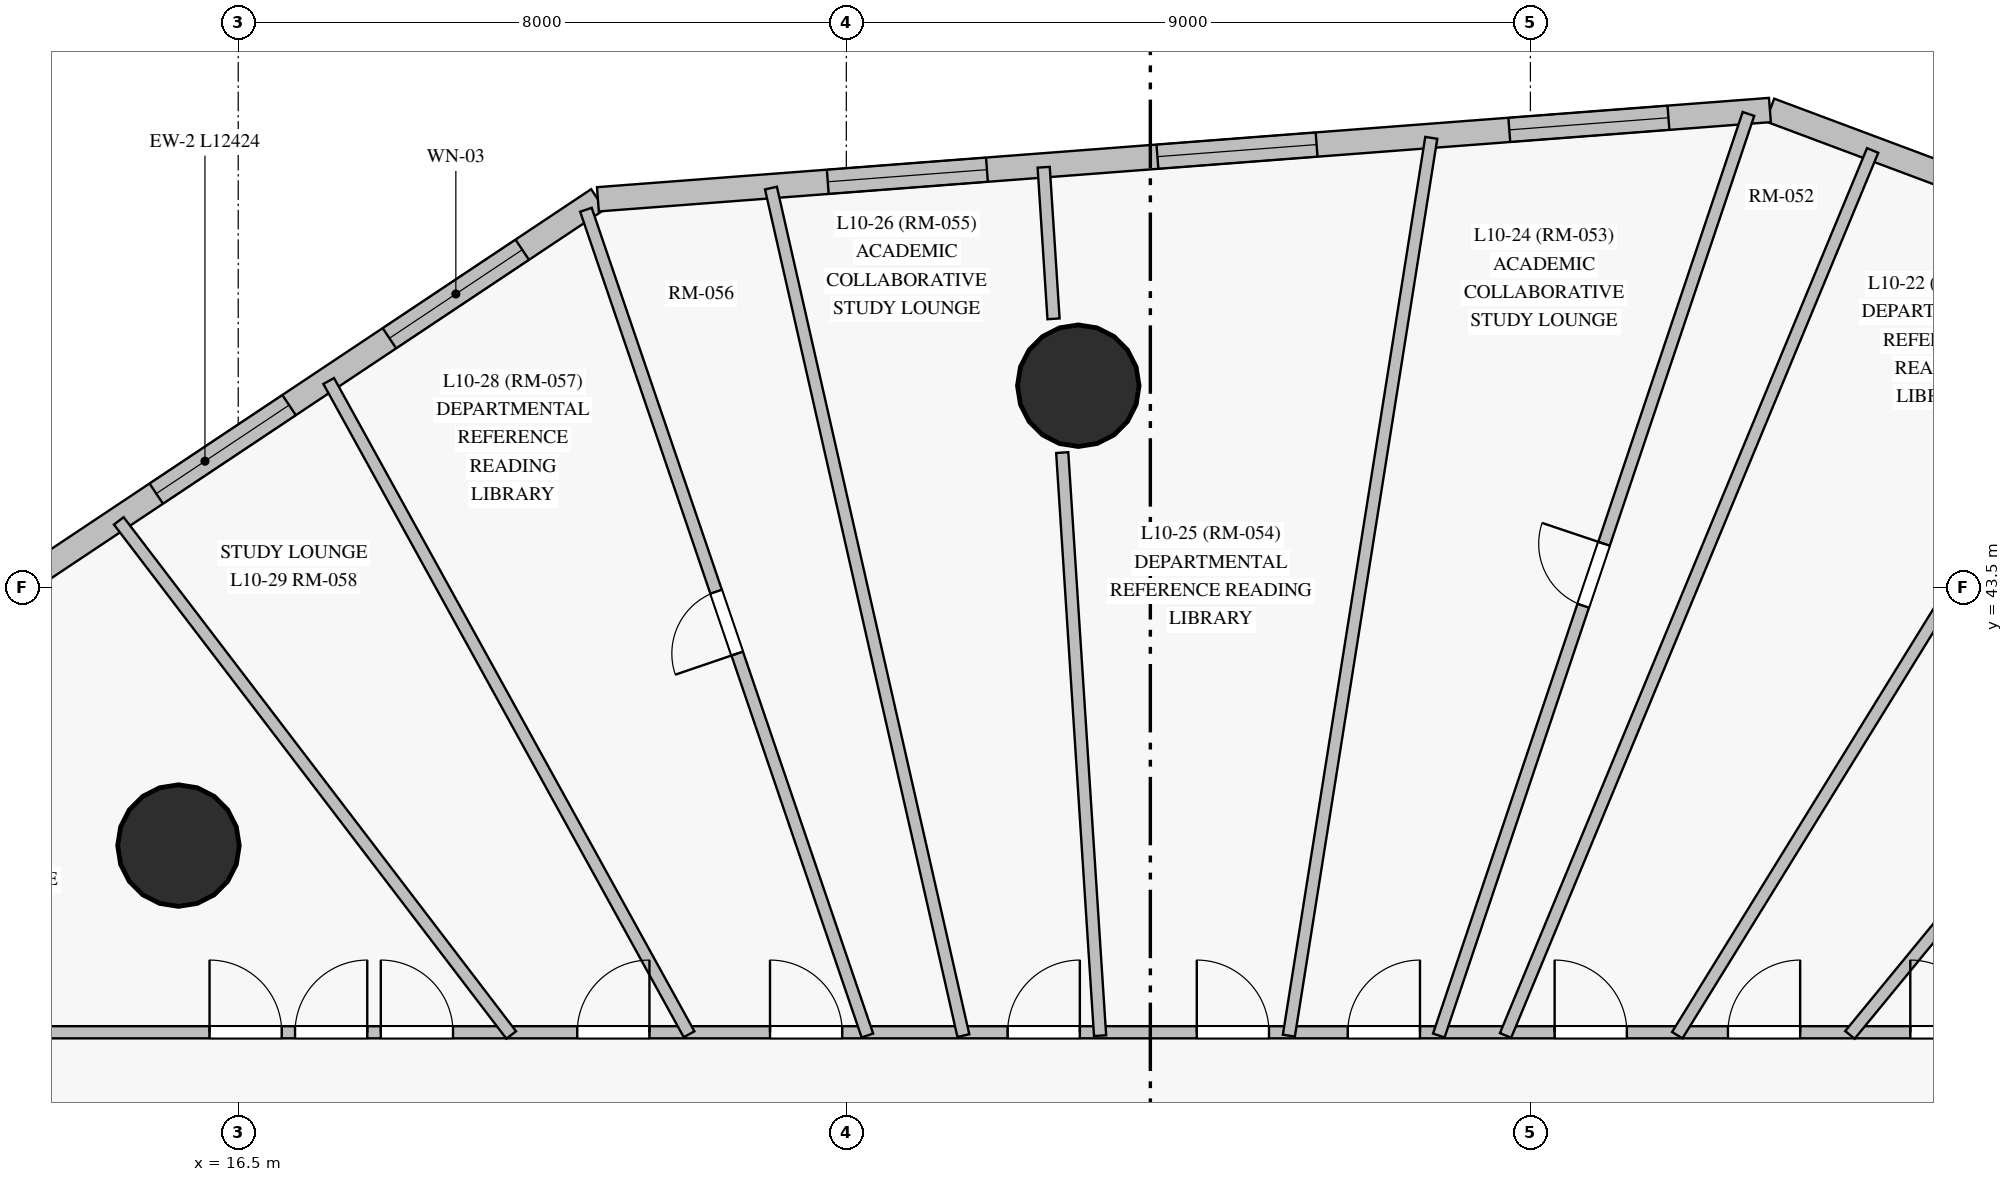
"""IFC4 building model, lengths in metres.
Left out: names, types, materials, properties, quantities, classifications, styles, units other than length and angle.
Written with IfcOpenShell. Run it as: python <this file> out.ifc"""

import sys

from ifc_helpers import new_model, si_unit, direction, frame, frame_2d, origin, origin_with_axes, origin_2d, place, context, subcontext, project, spatial, rectangle, circle, extrude, source, transform, mapped, element, fill, save


model = new_model("IFC4")
c1 = context("Model", 3, precision=1e-05, world=origin(), true_north=direction((0.0, 1.0)))
c2 = subcontext(c1, "Body", "Model", "MODEL_VIEW")
j1 = project(units=[si_unit("LENGTHUNIT", "METRE"), si_unit("PLANEANGLEUNIT", "RADIAN")], contexts=[c1])
p1 = place(None, origin())
s1 = spatial("IfcSite", under=j1, at=p1, CompositionType="ELEMENT")
p2 = place(p1, origin())
s2 = spatial("IfcBuilding", under=s1, at=p2, CompositionType="ELEMENT")
p3 = place(p2, frame((0.0, 0.0, 40.9)))
s3 = spatial("IfcBuildingStorey", under=s2, at=p3, CompositionType="ELEMENT", Elevation=40.9)
m1 = source(origin_with_axes(), c2, "Body", "SweptSolid", [
    extrude(circle(Radius=0.8, at=origin_2d()), origin(), (0.0, 0.0, 1.0), 3.6),
])
for number, where, z_axis, x_axis in (
    (1, (27.552, 46.156, 0.0), (0.0, 0.0, 1.0), (1.0, 0.0, 0.0)),
    (2, (15.714, 40.106, 0.0), (0.0, 0.0, 1.0), (1.0, 0.0, 0.0)),
):
    element("IfcColumn", number, at=place(p3, frame(where, z_axis=z_axis, x_axis=x_axis)), inside=s3, PredefinedType="COLUMN", context=c2, shape_type="MappedRepresentation", body=[
        mapped(m1, transform((0.0, 0.0, 0.0), scale=1.0)),
    ])
p4 = place(p3, frame((21.232, 48.608, 0.0), z_axis=(0.0, 0.0, 1.0), x_axis=(-0.832150043839, -0.554550542816, 0.0)))
e3 = element("IfcWall", 3, at=p4, inside=s3, PredefinedType="SOLIDWALL", context=c2, shape_type="SweptSolid", body=[
    extrude(rectangle(XDim=12.424, YDim=0.32, at=frame_2d((6.212, 0.0))), origin(), (0.0, 0.0, 1.0), 3.35),
])
p5 = place(p4, frame((1.196, 0.0, 0.85)))
e4 = element("IfcOpeningElement", 4, at=p5, cuts=e3, PredefinedType="OPENING", context=c2, shape_type="SweptSolid", body=[
    extrude(rectangle(XDim=2.1, YDim=1.95, at=frame_2d((1.05, 0.975))), frame((0.0, 0.17, 0.0), z_axis=(0.0, -1.0, 0.0), x_axis=(1.0, 0.0, 0.0)), (0.0, 0.0, 1.0), 0.34),
])
p6 = place(p4, frame((4.882, 0.0, 0.85)))
e5 = element("IfcOpeningElement", 5, at=p6, cuts=e3, PredefinedType="OPENING", context=c2, shape_type="SweptSolid", body=[
    extrude(rectangle(XDim=2.1, YDim=1.95, at=frame_2d((1.05, 0.975))), frame((0.0, 0.17, 0.0), z_axis=(0.0, -1.0, 0.0), x_axis=(1.0, 0.0, 0.0)), (0.0, 0.0, 1.0), 0.34),
])
p7 = place(p4, frame((8.927, 0.0, 0.85)))
e6 = element("IfcOpeningElement", 6, at=p7, cuts=e3, PredefinedType="OPENING", context=c2, shape_type="SweptSolid", body=[
    extrude(rectangle(XDim=2.1, YDim=1.95, at=frame_2d((1.05, 0.975))), frame((0.0, 0.17, 0.0), z_axis=(0.0, -1.0, 0.0), x_axis=(1.0, 0.0, 0.0)), (0.0, 0.0, 1.0), 0.34),
])
p8 = place(p3, frame((46.618, 46.054, 0.0), z_axis=(0.0, 0.0, 1.0), x_axis=(-0.936577845609, 0.350459611246, 0.0)))
e7 = element("IfcWall", 7, at=p8, inside=s3, PredefinedType="SOLIDWALL", context=c2, shape_type="SweptSolid", body=[
    extrude(rectangle(XDim=10.642, YDim=0.32, at=frame_2d((5.321, 0.0))), origin(), (0.0, 0.0, 1.0), 3.35),
])
p9 = place(p8, frame((2.368, 0.0, 0.85)))
e8 = element("IfcOpeningElement", 8, at=p9, cuts=e7, PredefinedType="OPENING", context=c2, shape_type="SweptSolid", body=[
    extrude(rectangle(XDim=2.1, YDim=1.95, at=frame_2d((1.05, 0.975))), frame((0.0, 0.17, 0.0), z_axis=(0.0, -1.0, 0.0), x_axis=(1.0, 0.0, 0.0)), (0.0, 0.0, 1.0), 0.34),
])
p10 = place(p8, frame((6.141, 0.0, 0.85)))
e9 = element("IfcOpeningElement", 9, at=p10, cuts=e7, PredefinedType="OPENING", context=c2, shape_type="SweptSolid", body=[
    extrude(rectangle(XDim=2.1, YDim=1.95, at=frame_2d((1.05, 0.975))), frame((0.0, 0.17, 0.0), z_axis=(0.0, -1.0, 0.0), x_axis=(1.0, 0.0, 0.0)), (0.0, 0.0, 1.0), 0.34),
])
p11 = place(p3, frame((36.651, 49.783, 0.0), z_axis=(0.0, 0.0, 1.0), x_axis=(-0.997110035998, -0.075970889897, 0.0)))
e10 = element("IfcWall", 10, at=p11, inside=s3, PredefinedType="SOLIDWALL", context=c2, shape_type="SweptSolid", body=[
    extrude(rectangle(XDim=15.464, YDim=0.32, at=frame_2d((7.732, 0.0))), origin(), (0.0, 0.0, 1.0), 3.35),
])
p12 = place(p11, frame((1.339, 0.0, 0.85)))
e11 = element("IfcOpeningElement", 11, at=p12, cuts=e10, PredefinedType="OPENING", context=c2, shape_type="SweptSolid", body=[
    extrude(rectangle(XDim=2.1, YDim=1.95, at=frame_2d((1.05, 0.975))), frame((0.0, 0.17, 0.0), z_axis=(0.0, -1.0, 0.0), x_axis=(1.0, 0.0, 0.0)), (0.0, 0.0, 1.0), 0.34),
])
p13 = place(p11, frame((5.981, 0.0, 0.85)))
e12 = element("IfcOpeningElement", 12, at=p13, cuts=e10, PredefinedType="OPENING", context=c2, shape_type="SweptSolid", body=[
    extrude(rectangle(XDim=2.1, YDim=1.95, at=frame_2d((1.05, 0.975))), frame((0.0, 0.17, 0.0), z_axis=(0.0, -1.0, 0.0), x_axis=(1.0, 0.0, 0.0)), (0.0, 0.0, 1.0), 0.34),
])
p14 = place(p11, frame((10.331, 0.0, 0.85)))
e13 = element("IfcOpeningElement", 13, at=p14, cuts=e10, PredefinedType="OPENING", context=c2, shape_type="SweptSolid", body=[
    extrude(rectangle(XDim=2.1, YDim=1.95, at=frame_2d((1.05, 0.975))), frame((0.0, 0.17, 0.0), z_axis=(0.0, -1.0, 0.0), x_axis=(1.0, 0.0, 0.0)), (0.0, 0.0, 1.0), 0.34),
])
p15 = place(p3, frame((10.5, 37.65, 0.0), z_axis=(0.0, 0.0, 1.0), x_axis=(1.0, 0.0, 0.0)))
e14 = element("IfcWall", 14, at=p15, inside=s3, PredefinedType="PARTITIONING", context=c2, shape_type="SweptSolid", body=[
    extrude(rectangle(XDim=29.75, YDim=0.16, at=frame_2d((14.875, 0.0))), origin(), (0.0, 0.0, 1.0), 2.75),
])
p16 = place(p15, frame((27.998, 0.0, 0.0)))
e15 = element("IfcOpeningElement", 15, at=p16, cuts=e14, PredefinedType="OPENING", context=c2, shape_type="SweptSolid", body=[
    extrude(rectangle(XDim=0.95, YDim=2.15, at=frame_2d((0.475, 1.075))), frame((0.0, 0.09, 0.0), z_axis=(0.0, -1.0, 0.0), x_axis=(1.0, 0.0, 0.0)), (0.0, 0.0, 1.0), 0.18),
])
p17 = place(p15, frame((25.599, 0.0, 0.0)))
e16 = element("IfcOpeningElement", 16, at=p17, cuts=e14, PredefinedType="OPENING", context=c2, shape_type="SweptSolid", body=[
    extrude(rectangle(XDim=0.95, YDim=2.15, at=frame_2d((0.475, 1.075))), frame((0.0, 0.09, 0.0), z_axis=(0.0, -1.0, 0.0), x_axis=(1.0, 0.0, 0.0)), (0.0, 0.0, 1.0), 0.18),
])
p18 = place(p15, frame((23.319, 0.0, 0.0)))
e17 = element("IfcOpeningElement", 17, at=p18, cuts=e14, PredefinedType="OPENING", context=c2, shape_type="SweptSolid", body=[
    extrude(rectangle(XDim=0.95, YDim=2.15, at=frame_2d((0.475, 1.075))), frame((0.0, 0.09, 0.0), z_axis=(0.0, -1.0, 0.0), x_axis=(1.0, 0.0, 0.0)), (0.0, 0.0, 1.0), 0.18),
])
p19 = place(p15, frame((20.597, 0.0, 0.0)))
e18 = element("IfcOpeningElement", 18, at=p19, cuts=e14, PredefinedType="OPENING", context=c2, shape_type="SweptSolid", body=[
    extrude(rectangle(XDim=0.95, YDim=2.15, at=frame_2d((0.475, 1.075))), frame((0.0, 0.09, 0.0), z_axis=(0.0, -1.0, 0.0), x_axis=(1.0, 0.0, 0.0)), (0.0, 0.0, 1.0), 0.18),
])
p20 = place(p15, frame((18.611, 0.0, 0.0)))
e19 = element("IfcOpeningElement", 19, at=p20, cuts=e14, PredefinedType="OPENING", context=c2, shape_type="SweptSolid", body=[
    extrude(rectangle(XDim=0.95, YDim=2.15, at=frame_2d((0.475, 1.075))), frame((0.0, 0.09, 0.0), z_axis=(0.0, -1.0, 0.0), x_axis=(1.0, 0.0, 0.0)), (0.0, 0.0, 1.0), 0.18),
])
p21 = place(p15, frame((16.123, 0.0, 0.0)))
e20 = element("IfcOpeningElement", 20, at=p21, cuts=e14, PredefinedType="OPENING", context=c2, shape_type="SweptSolid", body=[
    extrude(rectangle(XDim=0.95, YDim=2.15, at=frame_2d((0.475, 1.075))), frame((0.0, 0.09, 0.0), z_axis=(0.0, -1.0, 0.0), x_axis=(1.0, 0.0, 0.0)), (0.0, 0.0, 1.0), 0.18),
])
p22 = place(p15, frame((12.996, 0.0, 0.0)))
e21 = element("IfcOpeningElement", 21, at=p22, cuts=e14, PredefinedType="OPENING", context=c2, shape_type="SweptSolid", body=[
    extrude(rectangle(XDim=0.95, YDim=2.15, at=frame_2d((0.475, 1.075))), frame((0.0, 0.09, 0.0), z_axis=(0.0, -1.0, 0.0), x_axis=(1.0, 0.0, 0.0)), (0.0, 0.0, 1.0), 0.18),
])
p23 = place(p15, frame((10.46, 0.0, 0.0)))
e22 = element("IfcOpeningElement", 22, at=p23, cuts=e14, PredefinedType="OPENING", context=c2, shape_type="SweptSolid", body=[
    extrude(rectangle(XDim=0.95, YDim=2.15, at=frame_2d((0.475, 1.075))), frame((0.0, 0.09, 0.0), z_axis=(0.0, -1.0, 0.0), x_axis=(1.0, 0.0, 0.0)), (0.0, 0.0, 1.0), 0.18),
])
p24 = place(p15, frame((7.876, 0.0, 0.0)))
e23 = element("IfcOpeningElement", 23, at=p24, cuts=e14, PredefinedType="OPENING", context=c2, shape_type="SweptSolid", body=[
    extrude(rectangle(XDim=0.95, YDim=2.15, at=frame_2d((0.475, 1.075))), frame((0.0, 0.09, 0.0), z_axis=(0.0, -1.0, 0.0), x_axis=(1.0, 0.0, 0.0)), (0.0, 0.0, 1.0), 0.18),
])
p25 = place(p15, frame((6.748, 0.0, 0.0)))
e24 = element("IfcOpeningElement", 24, at=p25, cuts=e14, PredefinedType="OPENING", context=c2, shape_type="SweptSolid", body=[
    extrude(rectangle(XDim=0.95, YDim=2.15, at=frame_2d((0.475, 1.075))), frame((0.0, 0.09, 0.0), z_axis=(0.0, -1.0, 0.0), x_axis=(1.0, 0.0, 0.0)), (0.0, 0.0, 1.0), 0.18),
])
p26 = place(p15, frame((5.623, 0.0, 0.0)))
e25 = element("IfcOpeningElement", 25, at=p26, cuts=e14, PredefinedType="OPENING", context=c2, shape_type="SweptSolid", body=[
    extrude(rectangle(XDim=0.95, YDim=2.15, at=frame_2d((0.475, 1.075))), frame((0.0, 0.09, 0.0), z_axis=(0.0, -1.0, 0.0), x_axis=(1.0, 0.0, 0.0)), (0.0, 0.0, 1.0), 0.18),
])
p27 = place(p3, frame((32.295, 37.607, 0.0), z_axis=(0.0, 0.0, 1.0), x_axis=(0.318505986537, 0.947920849301, 0.0)))
e26 = element("IfcWall", 26, at=p27, inside=s3, PredefinedType="PARTITIONING", context=c2, shape_type="SweptSolid", body=[
    extrude(rectangle(XDim=12.79, YDim=0.16, at=frame_2d((6.395, 0.0))), origin(), (0.0, 0.0, 1.0), 3.35),
])
p28 = place(p27, frame((5.965, 0.0, 0.0)))
e27 = element("IfcOpeningElement", 27, at=p28, cuts=e26, PredefinedType="OPENING", context=c2, shape_type="SweptSolid", body=[
    extrude(rectangle(XDim=0.86, YDim=2.04, at=frame_2d((0.43, 1.02))), frame((0.0, 0.09, 0.0), z_axis=(0.0, -1.0, 0.0), x_axis=(1.0, 0.0, 0.0)), (0.0, 0.0, 1.0), 0.18),
])
p29 = place(p3, frame((33.173, 37.608, 0.0), z_axis=(0.0, 0.0, 1.0), x_axis=(0.383169413705, 0.923678082668, 0.0)))
e28 = element("IfcWall", 28, at=p29, inside=s3, PredefinedType="PARTITIONING", context=c2, shape_type="SweptSolid", body=[
    extrude(rectangle(XDim=12.604, YDim=0.16, at=frame_2d((6.302, 0.0))), origin(), (0.0, 0.0, 1.0), 3.35),
])
p30 = place(p3, frame((35.432, 37.612, 0.0), z_axis=(0.0, 0.0, 1.0), x_axis=(0.525422876005, 0.850841231588, 0.0)))
e29 = element("IfcWall", 29, at=p30, inside=s3, PredefinedType="PARTITIONING", context=c2, shape_type="SweptSolid", body=[
    extrude(rectangle(XDim=12.029, YDim=0.16, at=frame_2d((6.014, 0.0))), origin(), (0.0, 0.0, 1.0), 3.35),
])
p31 = place(p3, frame((30.323, 37.606, 0.0), z_axis=(0.0, 0.0, 1.0), x_axis=(0.156643954474, 0.987655137954, 0.0)))
e30 = element("IfcWall", 30, at=p31, inside=s3, PredefinedType="PARTITIONING", context=c2, shape_type="SweptSolid", body=[
    extrude(rectangle(XDim=11.959, YDim=0.16, at=frame_2d((5.979, 0.0))), origin(), (0.0, 0.0, 1.0), 3.35),
])
p32 = place(p3, frame((37.704, 37.615, 0.0), z_axis=(0.0, 0.0, 1.0), x_axis=(0.634552182482, 0.772880021547, 0.0)))
e31 = element("IfcWall", 31, at=p32, inside=s3, PredefinedType="PARTITIONING", context=c2, shape_type="SweptSolid", body=[
    extrude(rectangle(XDim=11.624, YDim=0.16, at=frame_2d((5.812, 0.0))), origin(), (0.0, 0.0, 1.0), 3.35),
])
p33 = place(p3, frame((24.777, 37.607, 0.0), z_axis=(0.0, 0.0, 1.0), x_axis=(-0.32262758447, 0.94652598577, 0.0)))
e32 = element("IfcWall", 32, at=p33, inside=s3, PredefinedType="PARTITIONING", context=c2, shape_type="SweptSolid", body=[
    extrude(rectangle(XDim=11.477, YDim=0.16, at=frame_2d((5.739, 0.0))), origin(), (0.0, 0.0, 1.0), 3.35),
])
p34 = place(p33, frame((5.309, 0.0, 0.0)))
e33 = element("IfcOpeningElement", 33, at=p34, cuts=e32, PredefinedType="OPENING", context=c2, shape_type="SweptSolid", body=[
    extrude(rectangle(XDim=0.86, YDim=2.04, at=frame_2d((0.43, 1.02))), frame((0.0, 0.09, 0.0), z_axis=(0.0, -1.0, 0.0), x_axis=(1.0, 0.0, 0.0)), (0.0, 0.0, 1.0), 0.18),
])
p35 = place(p3, frame((26.04, 37.606, 0.0), z_axis=(0.0, 0.0, 1.0), x_axis=(-0.221386676944, 0.975186104942, 0.0)))
e34 = element("IfcWall", 34, at=p35, inside=s3, PredefinedType="PARTITIONING", context=c2, shape_type="SweptSolid", body=[
    extrude(rectangle(XDim=11.434, YDim=0.16, at=frame_2d((5.717, 0.0))), origin(), (0.0, 0.0, 1.0), 3.35),
])
p36 = place(p3, frame((22.432, 37.624, 0.0), z_axis=(0.0, 0.0, 1.0), x_axis=(-0.483043149999, 0.875596548211, 0.0)))
e35 = element("IfcWall", 35, at=p36, inside=s3, PredefinedType="PARTITIONING", context=c2, shape_type="SweptSolid", body=[
    extrude(rectangle(XDim=9.815, YDim=0.16, at=frame_2d((4.908, 0.0))), origin(), (0.0, 0.0, 1.0), 3.35),
])
p37 = place(p3, frame((20.091, 37.614, 0.0), z_axis=(0.0, 0.0, 1.0), x_axis=(-0.606768271493, 0.794878773593, 0.0)))
e36 = element("IfcWall", 36, at=p37, inside=s3, PredefinedType="PARTITIONING", context=c2, shape_type="SweptSolid", body=[
    extrude(rectangle(XDim=8.509, YDim=0.16, at=frame_2d((4.254, 0.0))), origin(), (0.0, 0.0, 1.0), 3.35),
])
p38 = place(p3, frame((27.839, 37.605, 0.0), z_axis=(0.0, 0.0, 1.0), x_axis=(-0.064822006833, 0.997896842078, 0.0)))
e37 = element("IfcWall", 37, at=p38, inside=s3, PredefinedType="PARTITIONING", context=c2, shape_type="SweptSolid", body=[
    extrude(rectangle(XDim=7.687, YDim=0.16, at=frame_2d((3.844, 0.0))), origin(), (0.0, 0.0, 1.0), 2.7),
])
p39 = place(p3, frame((27.226, 47.036, 0.0), z_axis=(0.0, 0.0, 1.0), x_axis=(-0.064872853647, 0.997893537838, 0.0)))
e38 = element("IfcWall", 38, at=p39, inside=s3, PredefinedType="PARTITIONING", context=c2, shape_type="SweptSolid", body=[
    extrude(rectangle(XDim=1.998, YDim=0.16, at=frame_2d((0.999, 0.0))), origin(), (0.0, 0.0, 1.0), 3.35),
])
m2 = source(origin_with_axes(), c2, "Body", "SweptSolid", [
    extrude(rectangle(XDim=2.1, YDim=1.95, at=frame_2d((1.05, 0.975))), frame((0.0, 0.03, 0.0), z_axis=(0.0, -1.0, 0.0), x_axis=(1.0, 0.0, 0.0)), (0.0, 0.0, 1.0), 0.06),
])
p40 = place(p5, origin())
e39 = element("IfcWindow", 39, at=p40, inside=s3, PartitioningType="SINGLE_PANEL", PredefinedType="WINDOW", context=c2, shape_type="MappedRepresentation", body=[
    mapped(m2, transform((0.0, 0.0, 0.0), scale=1.0)),
])
fill(e4, e39)
p41 = place(p6, origin())
e40 = element("IfcWindow", 40, at=p41, inside=s3, PartitioningType="SINGLE_PANEL", PredefinedType="WINDOW", context=c2, shape_type="MappedRepresentation", body=[
    mapped(m2, transform((0.0, 0.0, 0.0), scale=1.0)),
])
fill(e5, e40)
p42 = place(p12, origin())
e41 = element("IfcWindow", 41, at=p42, inside=s3, PartitioningType="SINGLE_PANEL", PredefinedType="WINDOW", context=c2, shape_type="MappedRepresentation", body=[
    mapped(m2, transform((0.0, 0.0, 0.0), scale=1.0)),
])
fill(e11, e41)
p43 = place(p13, origin())
e42 = element("IfcWindow", 42, at=p43, inside=s3, PartitioningType="SINGLE_PANEL", PredefinedType="WINDOW", context=c2, shape_type="MappedRepresentation", body=[
    mapped(m2, transform((0.0, 0.0, 0.0), scale=1.0)),
])
fill(e12, e42)
p44 = place(p14, origin())
e43 = element("IfcWindow", 43, at=p44, inside=s3, PartitioningType="SINGLE_PANEL", PredefinedType="WINDOW", context=c2, shape_type="MappedRepresentation", body=[
    mapped(m2, transform((0.0, 0.0, 0.0), scale=1.0)),
])
fill(e13, e43)
m3 = source(origin_with_axes(), c2, "Body", "SweptSolid", [
    extrude(rectangle(XDim=0.95, YDim=2.15, at=frame_2d((0.475, 1.075))), frame((0.0, 0.025, 0.0), z_axis=(0.0, -1.0, 0.0), x_axis=(1.0, 0.0, 0.0)), (0.0, 0.0, 1.0), 0.05),
])
p45 = place(p16, origin())
e44 = element("IfcDoor", 44, at=p45, inside=s3, OperationType="SINGLE_SWING_LEFT", PredefinedType="DOOR", context=c2, shape_type="MappedRepresentation", body=[
    mapped(m3, transform((0.0, 0.0, 0.0), scale=1.0)),
])
fill(e15, e44)
p46 = place(p17, origin())
e45 = element("IfcDoor", 45, at=p46, inside=s3, OperationType="SINGLE_SWING_RIGHT", PredefinedType="DOOR", context=c2, shape_type="MappedRepresentation", body=[
    mapped(m3, transform((0.0, 0.0, 0.0), scale=1.0)),
])
fill(e16, e45)
p47 = place(p18, origin())
e46 = element("IfcDoor", 46, at=p47, inside=s3, OperationType="SINGLE_SWING_LEFT", PredefinedType="DOOR", context=c2, shape_type="MappedRepresentation", body=[
    mapped(m3, transform((0.0, 0.0, 0.0), scale=1.0)),
])
fill(e17, e46)
p48 = place(p19, origin())
e47 = element("IfcDoor", 47, at=p48, inside=s3, OperationType="SINGLE_SWING_RIGHT", PredefinedType="DOOR", context=c2, shape_type="MappedRepresentation", body=[
    mapped(m3, transform((0.0, 0.0, 0.0), scale=1.0)),
])
fill(e18, e47)
p49 = place(p20, origin())
e48 = element("IfcDoor", 48, at=p49, inside=s3, OperationType="SINGLE_SWING_LEFT", PredefinedType="DOOR", context=c2, shape_type="MappedRepresentation", body=[
    mapped(m3, transform((0.0, 0.0, 0.0), scale=1.0)),
])
fill(e19, e48)
p50 = place(p21, origin())
e49 = element("IfcDoor", 49, at=p50, inside=s3, OperationType="SINGLE_SWING_RIGHT", PredefinedType="DOOR", context=c2, shape_type="MappedRepresentation", body=[
    mapped(m3, transform((0.0, 0.0, 0.0), scale=1.0)),
])
fill(e20, e49)
p51 = place(p22, origin())
e50 = element("IfcDoor", 50, at=p51, inside=s3, OperationType="SINGLE_SWING_LEFT", PredefinedType="DOOR", context=c2, shape_type="MappedRepresentation", body=[
    mapped(m3, transform((0.0, 0.0, 0.0), scale=1.0)),
])
fill(e21, e50)
p52 = place(p23, origin())
e51 = element("IfcDoor", 51, at=p52, inside=s3, OperationType="SINGLE_SWING_RIGHT", PredefinedType="DOOR", context=c2, shape_type="MappedRepresentation", body=[
    mapped(m3, transform((0.0, 0.0, 0.0), scale=1.0)),
])
fill(e22, e51)
p53 = place(p24, origin())
e52 = element("IfcDoor", 52, at=p53, inside=s3, OperationType="SINGLE_SWING_LEFT", PredefinedType="DOOR", context=c2, shape_type="MappedRepresentation", body=[
    mapped(m3, transform((0.0, 0.0, 0.0), scale=1.0)),
])
fill(e23, e52)
p54 = place(p25, origin())
e53 = element("IfcDoor", 53, at=p54, inside=s3, OperationType="SINGLE_SWING_RIGHT", PredefinedType="DOOR", context=c2, shape_type="MappedRepresentation", body=[
    mapped(m3, transform((0.0, 0.0, 0.0), scale=1.0)),
])
fill(e24, e53)
p55 = place(p26, origin())
e54 = element("IfcDoor", 54, at=p55, inside=s3, OperationType="SINGLE_SWING_LEFT", PredefinedType="DOOR", context=c2, shape_type="MappedRepresentation", body=[
    mapped(m3, transform((0.0, 0.0, 0.0), scale=1.0)),
])
fill(e25, e54)
m4 = source(origin_with_axes(), c2, "Body", "SweptSolid", [
    extrude(rectangle(XDim=0.86, YDim=2.04, at=frame_2d((0.43, 1.02))), frame((0.0, 0.025, 0.0), z_axis=(0.0, -1.0, 0.0), x_axis=(1.0, 0.0, 0.0)), (0.0, 0.0, 1.0), 0.05),
])
p56 = place(p28, origin())
e55 = element("IfcDoor", 55, at=p56, inside=s3, OperationType="SINGLE_SWING_RIGHT", PredefinedType="DOOR", context=c2, shape_type="MappedRepresentation", body=[
    mapped(m4, transform((0.0, 0.0, 0.0), scale=1.0)),
])
fill(e27, e55)
p57 = place(p34, origin())
e56 = element("IfcDoor", 56, at=p57, inside=s3, OperationType="SINGLE_SWING_LEFT", PredefinedType="DOOR", context=c2, shape_type="MappedRepresentation", body=[
    mapped(m4, transform((0.0, 0.0, 0.0), scale=1.0)),
])
fill(e33, e56)
save(model, sys.argv[1])
